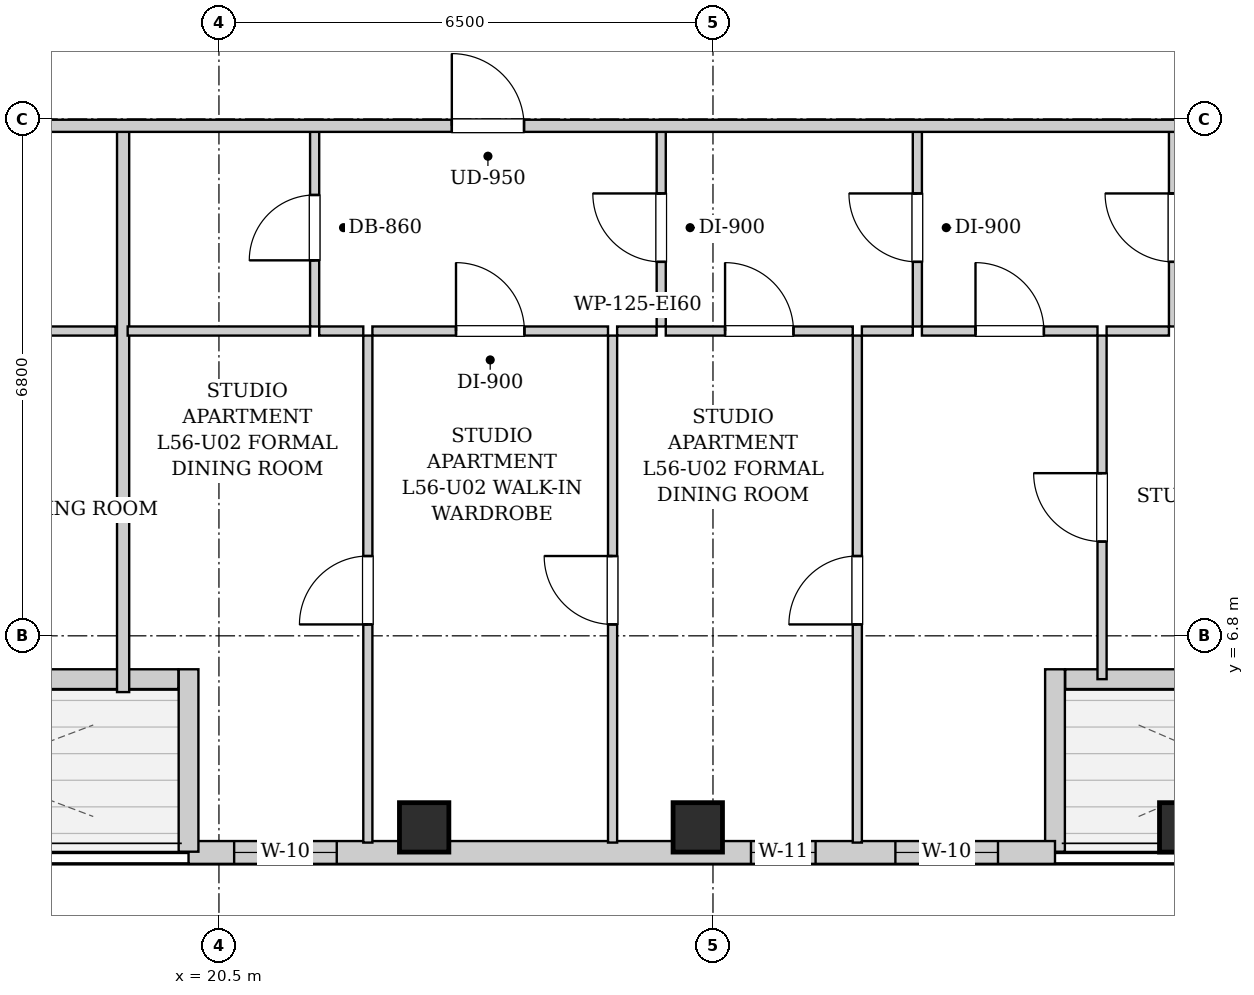
"""IFC4 building model, lengths in metres.
Left out: names, types, materials, properties, quantities, classifications, styles, units other than length and angle.
Written with IfcOpenShell. Run it as: python <this file> out.ifc"""

import sys

from ifc_helpers import new_model, si_unit, direction, frame, frame_2d, origin, origin_2d, place, context, subcontext, project, spatial, rectangle, extrude, element, fill, save


model = new_model("IFC4")
c1 = context("Model", 3, precision=1e-05, world=origin(), true_north=direction((0.0, 1.0)))
c2 = subcontext(c1, "Body", "Model", "MODEL_VIEW")
j1 = project(units=[si_unit("LENGTHUNIT", "METRE"), si_unit("PLANEANGLEUNIT", "RADIAN")], contexts=[c1])
p1 = place(None, origin())
s1 = spatial("IfcSite", under=j1, at=p1, CompositionType="ELEMENT")
p2 = place(p1, origin())
s2 = spatial("IfcBuilding", under=s1, at=p2, CompositionType="ELEMENT")
p3 = place(p2, frame((0.0, 0.0, 194.2)))
s3 = spatial("IfcBuildingStorey", under=s2, at=p3, CompositionType="ELEMENT", Elevation=194.2)
for number, where, z_axis, x_axis in (
    (1, (23.2, 4.28, 0.0), (0.0, 0.0, 1.0), (1.0, 0.0, 0.0)),
    (2, (26.8, 4.28, 0.0), (0.0, 0.0, 1.0), (1.0, 0.0, 0.0)),
    (3, (33.2, 4.28, 0.0), (0.0, 0.0, 1.0), (1.0, 0.0, 0.0)),
):
    element("IfcColumn", number, at=place(p3, frame(where, z_axis=z_axis, x_axis=x_axis)), inside=s3, PredefinedType="COLUMN", context=c2, shape_type="SweptSolid", body=[
        extrude(rectangle(XDim=0.65, YDim=0.65, at=origin_2d()), origin(), (0.0, 0.0, 1.0), 3.3),
    ])
p4 = place(p3, frame((36.366, 6.23, 0.0), z_axis=(0.0, 0.0, 1.0), x_axis=(-1.0, 0.0, 0.0)))
e4 = element("IfcWall", 4, at=p4, inside=s3, PredefinedType="SOLIDWALL", context=c2, shape_type="SweptSolid", body=[
    extrude(rectangle(XDim=4.732, YDim=0.26, at=frame_2d((2.366, 0.0))), origin(), (0.0, 0.0, 1.0), 3.04),
])
p5 = place(p4, frame((1.816, 0.0, 0.0)))
e5 = element("IfcOpeningElement", 5, at=p5, cuts=e4, PredefinedType="OPENING", context=c2, shape_type="SweptSolid", body=[
    extrude(rectangle(XDim=1.1, YDim=2.0, at=frame_2d((0.55, 1.0))), frame((0.0, 0.14, 0.0), z_axis=(0.0, -1.0, 0.0), x_axis=(1.0, 0.0, 0.0)), (0.0, 0.0, 1.0), 0.28),
])
p6 = place(p3, frame((31.5, 6.36, 0.0), z_axis=(0.0, 0.0, 1.0), x_axis=(0.0, -1.0, 0.0)))
e6 = element("IfcWall", 6, at=p6, inside=s3, PredefinedType="SOLIDWALL", context=c2, shape_type="SweptSolid", body=[
    extrude(rectangle(XDim=2.4, YDim=0.26, at=frame_2d((1.2, 0.0))), origin(), (0.0, 0.0, 1.0), 3.04),
])
p7 = place(p3, frame((31.5, 3.95, 0.0), z_axis=(0.0, 0.0, 1.0), x_axis=(-1.0, 0.0, 0.0)))
e7 = element("IfcWall", 7, at=p7, inside=s3, PredefinedType="SOLIDWALL", context=c2, shape_type="SweptSolid", body=[
    extrude(rectangle(XDim=11.4, YDim=0.3, at=frame_2d((5.7, 0.0))), origin(), (0.0, 0.0, 1.0), 3.04),
])
p8 = place(p7, frame((9.45, 0.0, 0.55)))
e8 = element("IfcOpeningElement", 8, at=p8, cuts=e7, PredefinedType="OPENING", context=c2, shape_type="SweptSolid", body=[
    extrude(rectangle(XDim=1.35, YDim=1.2, at=frame_2d((0.675, 0.6))), frame((0.0, 0.16, 0.0), z_axis=(0.0, -1.0, 0.0), x_axis=(1.0, 0.0, 0.0)), (0.0, 0.0, 1.0), 0.32),
])
p9 = place(p7, frame((3.15, 0.0, 0.55)))
e9 = element("IfcOpeningElement", 9, at=p9, cuts=e7, PredefinedType="OPENING", context=c2, shape_type="SweptSolid", body=[
    extrude(rectangle(XDim=0.85, YDim=1.2, at=frame_2d((0.425, 0.6))), frame((0.0, 0.16, 0.0), z_axis=(0.0, -1.0, 0.0), x_axis=(1.0, 0.0, 0.0)), (0.0, 0.0, 1.0), 0.32),
])
p10 = place(p7, frame((0.75, 0.0, 0.55)))
e10 = element("IfcOpeningElement", 10, at=p10, cuts=e7, PredefinedType="OPENING", context=c2, shape_type="SweptSolid", body=[
    extrude(rectangle(XDim=1.35, YDim=1.2, at=frame_2d((0.675, 0.6))), frame((0.0, 0.16, 0.0), z_axis=(0.0, -1.0, 0.0), x_axis=(1.0, 0.0, 0.0)), (0.0, 0.0, 1.0), 0.32),
])
p11 = place(p3, frame((20.1, 3.96, 0.0), z_axis=(0.0, 0.0, 1.0), x_axis=(0.0, 1.0, 0.0)))
e11 = element("IfcWall", 11, at=p11, inside=s3, PredefinedType="SOLIDWALL", context=c2, shape_type="SweptSolid", body=[
    extrude(rectangle(XDim=2.4, YDim=0.26, at=frame_2d((1.2, 0.0))), origin(), (0.0, 0.0, 1.0), 3.04),
])
p12 = place(p3, frame((19.966, 6.23, 0.0), z_axis=(0.0, 0.0, 1.0), x_axis=(-1.0, 0.0, 0.0)))
e12 = element("IfcWall", 12, at=p12, inside=s3, PredefinedType="SOLIDWALL", context=c2, shape_type="SweptSolid", body=[
    extrude(rectangle(XDim=5.432, YDim=0.26, at=frame_2d((2.716, 0.0))), origin(), (0.0, 0.0, 1.0), 3.04),
])
p13 = place(p12, frame((2.166, 0.0, 0.0)))
e13 = element("IfcOpeningElement", 13, at=p13, cuts=e12, PredefinedType="OPENING", context=c2, shape_type="SweptSolid", body=[
    extrude(rectangle(XDim=1.1, YDim=2.0, at=frame_2d((0.55, 1.0))), frame((0.0, 0.14, 0.0), z_axis=(0.0, -1.0, 0.0), x_axis=(1.0, 0.0, 0.0)), (0.0, 0.0, 1.0), 0.28),
])
p14 = place(p3, frame((15.15, 10.81, 0.0), z_axis=(0.0, 0.0, 1.0), x_axis=(1.0, 0.0, 0.0)))
e14 = element("IfcWall", 14, at=p14, inside=s3, PredefinedType="PARTITIONING", context=c2, shape_type="SweptSolid", body=[
    extrude(rectangle(XDim=3.989, YDim=0.12, at=frame_2d((1.995, 0.0))), origin(), (0.0, 0.0, 1.0), 3.04),
])
p15 = place(p14, frame((1.544, 0.0, 0.0)))
e15 = element("IfcOpeningElement", 15, at=p15, cuts=e14, PredefinedType="OPENING", context=c2, shape_type="SweptSolid", body=[
    extrude(rectangle(XDim=0.9, YDim=2.05, at=frame_2d((0.45, 1.025))), frame((0.0, 0.07, 0.0), z_axis=(0.0, -1.0, 0.0), x_axis=(1.0, 0.0, 0.0)), (0.0, 0.0, 1.0), 0.14),
])
p16 = place(p3, frame((19.239, 6.06, 0.0), z_axis=(0.0, 0.0, 1.0), x_axis=(0.0, 1.0, 0.0)))
e16 = element("IfcWall", 16, at=p16, inside=s3, PredefinedType="PARTITIONING", context=c2, shape_type="SweptSolid", body=[
    extrude(rectangle(XDim=7.41, YDim=0.16, at=frame_2d((3.705, 0.0))), origin(), (0.0, 0.0, 1.0), 3.04),
])
p17 = place(p3, frame((21.759, 10.87, 0.0), z_axis=(0.0, 0.0, 1.0), x_axis=(0.0, 1.0, 0.0)))
e17 = element("IfcWall", 17, at=p17, inside=s3, PredefinedType="PARTITIONING", context=c2, shape_type="SweptSolid", body=[
    extrude(rectangle(XDim=2.6, YDim=0.12, at=frame_2d((1.3, 0.0))), origin(), (0.0, 0.0, 1.0), 3.04),
])
p18 = place(p17, frame((0.87, 0.0, 0.0)))
e18 = element("IfcOpeningElement", 18, at=p18, cuts=e17, PredefinedType="OPENING", context=c2, shape_type="SweptSolid", body=[
    extrude(rectangle(XDim=0.86, YDim=2.05, at=frame_2d((0.43, 1.025))), frame((0.0, 0.07, 0.0), z_axis=(0.0, -1.0, 0.0), x_axis=(1.0, 0.0, 0.0)), (0.0, 0.0, 1.0), 0.14),
])
p19 = place(p3, frame((19.299, 10.81, 0.0), z_axis=(0.0, 0.0, 1.0), x_axis=(1.0, 0.0, 0.0)))
e19 = element("IfcWall", 19, at=p19, inside=s3, PredefinedType="PARTITIONING", context=c2, shape_type="SweptSolid", body=[
    extrude(rectangle(XDim=2.4, YDim=0.12, at=frame_2d((1.2, 0.0))), origin(), (0.0, 0.0, 1.0), 3.04),
])
p20 = place(p3, frame((26.319, 10.87, 0.0), z_axis=(0.0, 0.0, 1.0), x_axis=(0.0, 1.0, 0.0)))
e20 = element("IfcWall", 20, at=p20, inside=s3, PredefinedType="PARTITIONING", context=c2, shape_type="SweptSolid", body=[
    extrude(rectangle(XDim=2.6, YDim=0.12, at=frame_2d((1.3, 0.0))), origin(), (0.0, 0.0, 1.0), 3.04),
])
p21 = place(p20, frame((0.85, 0.0, 0.0)))
e21 = element("IfcOpeningElement", 21, at=p21, cuts=e20, PredefinedType="OPENING", context=c2, shape_type="SweptSolid", body=[
    extrude(rectangle(XDim=0.9, YDim=2.05, at=frame_2d((0.45, 1.025))), frame((0.0, 0.07, 0.0), z_axis=(0.0, -1.0, 0.0), x_axis=(1.0, 0.0, 0.0)), (0.0, 0.0, 1.0), 0.14),
])
p22 = place(p3, frame((21.819, 10.81, 0.0), z_axis=(0.0, 0.0, 1.0), x_axis=(1.0, 0.0, 0.0)))
e22 = element("IfcWall", 22, at=p22, inside=s3, PredefinedType="PARTITIONING", context=c2, shape_type="SweptSolid", body=[
    extrude(rectangle(XDim=0.58, YDim=0.12, at=frame_2d((0.29, 0.0))), origin(), (0.0, 0.0, 1.0), 3.04),
])
p23 = place(p3, frame((22.519, 10.81, 0.0), z_axis=(0.0, 0.0, 1.0), x_axis=(1.0, 0.0, 0.0)))
e23 = element("IfcWall", 23, at=p23, inside=s3, PredefinedType="PARTITIONING", context=c2, shape_type="SweptSolid", body=[
    extrude(rectangle(XDim=3.1, YDim=0.12, at=frame_2d((1.55, 0.0))), origin(), (0.0, 0.0, 1.0), 3.04),
])
p24 = place(p23, frame((1.1, 0.0, 0.0)))
e24 = element("IfcOpeningElement", 24, at=p24, cuts=e23, PredefinedType="OPENING", context=c2, shape_type="SweptSolid", body=[
    extrude(rectangle(XDim=0.9, YDim=2.05, at=frame_2d((0.45, 1.025))), frame((0.0, 0.07, 0.0), z_axis=(0.0, -1.0, 0.0), x_axis=(1.0, 0.0, 0.0)), (0.0, 0.0, 1.0), 0.14),
])
p25 = place(p3, frame((25.739, 10.81, 0.0), z_axis=(0.0, 0.0, 1.0), x_axis=(1.0, 0.0, 0.0)))
e25 = element("IfcWall", 25, at=p25, inside=s3, PredefinedType="PARTITIONING", context=c2, shape_type="SweptSolid", body=[
    extrude(rectangle(XDim=0.52, YDim=0.12, at=frame_2d((0.26, 0.0))), origin(), (0.0, 0.0, 1.0), 3.04),
])
p26 = place(p3, frame((29.689, 10.87, 0.0), z_axis=(0.0, 0.0, 1.0), x_axis=(0.0, 1.0, 0.0)))
e26 = element("IfcWall", 26, at=p26, inside=s3, PredefinedType="PARTITIONING", context=c2, shape_type="SweptSolid", body=[
    extrude(rectangle(XDim=2.6, YDim=0.12, at=frame_2d((1.3, 0.0))), origin(), (0.0, 0.0, 1.0), 3.04),
])
p27 = place(p26, frame((0.85, 0.0, 0.0)))
e27 = element("IfcOpeningElement", 27, at=p27, cuts=e26, PredefinedType="OPENING", context=c2, shape_type="SweptSolid", body=[
    extrude(rectangle(XDim=0.9, YDim=2.05, at=frame_2d((0.45, 1.025))), frame((0.0, 0.07, 0.0), z_axis=(0.0, -1.0, 0.0), x_axis=(1.0, 0.0, 0.0)), (0.0, 0.0, 1.0), 0.14),
])
p28 = place(p3, frame((26.379, 10.81, 0.0), z_axis=(0.0, 0.0, 1.0), x_axis=(1.0, 0.0, 0.0)))
e28 = element("IfcWall", 28, at=p28, inside=s3, PredefinedType="PARTITIONING", context=c2, shape_type="SweptSolid", body=[
    extrude(rectangle(XDim=2.46, YDim=0.12, at=frame_2d((1.23, 0.0))), origin(), (0.0, 0.0, 1.0), 3.04),
])
p29 = place(p28, frame((0.78, 0.0, 0.0)))
e29 = element("IfcOpeningElement", 29, at=p29, cuts=e28, PredefinedType="OPENING", context=c2, shape_type="SweptSolid", body=[
    extrude(rectangle(XDim=0.9, YDim=2.05, at=frame_2d((0.45, 1.025))), frame((0.0, 0.07, 0.0), z_axis=(0.0, -1.0, 0.0), x_axis=(1.0, 0.0, 0.0)), (0.0, 0.0, 1.0), 0.14),
])
p30 = place(p3, frame((28.959, 10.81, 0.0), z_axis=(0.0, 0.0, 1.0), x_axis=(1.0, 0.0, 0.0)))
e30 = element("IfcWall", 30, at=p30, inside=s3, PredefinedType="PARTITIONING", context=c2, shape_type="SweptSolid", body=[
    extrude(rectangle(XDim=0.67, YDim=0.12, at=frame_2d((0.335, 0.0))), origin(), (0.0, 0.0, 1.0), 3.04),
])
p31 = place(p3, frame((33.059, 10.87, 0.0), z_axis=(0.0, 0.0, 1.0), x_axis=(0.0, 1.0, 0.0)))
e31 = element("IfcWall", 31, at=p31, inside=s3, PredefinedType="PARTITIONING", context=c2, shape_type="SweptSolid", body=[
    extrude(rectangle(XDim=2.6, YDim=0.12, at=frame_2d((1.3, 0.0))), origin(), (0.0, 0.0, 1.0), 3.04),
])
p32 = place(p31, frame((0.85, 0.0, 0.0)))
e32 = element("IfcOpeningElement", 32, at=p32, cuts=e31, PredefinedType="OPENING", context=c2, shape_type="SweptSolid", body=[
    extrude(rectangle(XDim=0.9, YDim=2.05, at=frame_2d((0.45, 1.025))), frame((0.0, 0.07, 0.0), z_axis=(0.0, -1.0, 0.0), x_axis=(1.0, 0.0, 0.0)), (0.0, 0.0, 1.0), 0.14),
])
p33 = place(p3, frame((29.749, 10.81, 0.0), z_axis=(0.0, 0.0, 1.0), x_axis=(1.0, 0.0, 0.0)))
e33 = element("IfcWall", 33, at=p33, inside=s3, PredefinedType="PARTITIONING", context=c2, shape_type="SweptSolid", body=[
    extrude(rectangle(XDim=2.31, YDim=0.12, at=frame_2d((1.155, 0.0))), origin(), (0.0, 0.0, 1.0), 3.04),
])
p34 = place(p33, frame((0.705, 0.0, 0.0)))
e34 = element("IfcOpeningElement", 34, at=p34, cuts=e33, PredefinedType="OPENING", context=c2, shape_type="SweptSolid", body=[
    extrude(rectangle(XDim=0.9, YDim=2.05, at=frame_2d((0.45, 1.025))), frame((0.0, 0.07, 0.0), z_axis=(0.0, -1.0, 0.0), x_axis=(1.0, 0.0, 0.0)), (0.0, 0.0, 1.0), 0.14),
])
p35 = place(p3, frame((32.179, 10.81, 0.0), z_axis=(0.0, 0.0, 1.0), x_axis=(1.0, 0.0, 0.0)))
e35 = element("IfcWall", 35, at=p35, inside=s3, PredefinedType="PARTITIONING", context=c2, shape_type="SweptSolid", body=[
    extrude(rectangle(XDim=0.82, YDim=0.12, at=frame_2d((0.41, 0.0))), origin(), (0.0, 0.0, 1.0), 3.04),
])
p36 = place(p3, frame((22.459, 4.08, 0.0), z_axis=(0.0, 0.0, 1.0), x_axis=(0.0, 1.0, 0.0)))
e36 = element("IfcWall", 36, at=p36, inside=s3, PredefinedType="PARTITIONING", context=c2, shape_type="SweptSolid", body=[
    extrude(rectangle(XDim=6.67, YDim=0.12, at=frame_2d((3.335, 0.0))), origin(), (0.0, 0.0, 1.0), 3.04),
])
p37 = place(p36, frame((2.87, 0.0, 0.0)))
e37 = element("IfcOpeningElement", 37, at=p37, cuts=e36, PredefinedType="OPENING", context=c2, shape_type="SweptSolid", body=[
    extrude(rectangle(XDim=0.9, YDim=2.05, at=frame_2d((0.45, 1.025))), frame((0.0, 0.07, 0.0), z_axis=(0.0, -1.0, 0.0), x_axis=(1.0, 0.0, 0.0)), (0.0, 0.0, 1.0), 0.14),
])
p38 = place(p3, frame((25.679, 4.08, 0.0), z_axis=(0.0, 0.0, 1.0), x_axis=(0.0, 1.0, 0.0)))
e38 = element("IfcWall", 38, at=p38, inside=s3, PredefinedType="PARTITIONING", context=c2, shape_type="SweptSolid", body=[
    extrude(rectangle(XDim=6.67, YDim=0.12, at=frame_2d((3.335, 0.0))), origin(), (0.0, 0.0, 1.0), 3.04),
])
p39 = place(p38, frame((2.87, 0.0, 0.0)))
e39 = element("IfcOpeningElement", 39, at=p39, cuts=e38, PredefinedType="OPENING", context=c2, shape_type="SweptSolid", body=[
    extrude(rectangle(XDim=0.9, YDim=2.05, at=frame_2d((0.45, 1.025))), frame((0.0, 0.07, 0.0), z_axis=(0.0, -1.0, 0.0), x_axis=(1.0, 0.0, 0.0)), (0.0, 0.0, 1.0), 0.14),
])
p40 = place(p3, frame((28.899, 4.08, 0.0), z_axis=(0.0, 0.0, 1.0), x_axis=(0.0, 1.0, 0.0)))
e40 = element("IfcWall", 40, at=p40, inside=s3, PredefinedType="PARTITIONING", context=c2, shape_type="SweptSolid", body=[
    extrude(rectangle(XDim=6.67, YDim=0.12, at=frame_2d((3.335, 0.0))), origin(), (0.0, 0.0, 1.0), 3.04),
])
p41 = place(p40, frame((2.87, 0.0, 0.0)))
e41 = element("IfcOpeningElement", 41, at=p41, cuts=e40, PredefinedType="OPENING", context=c2, shape_type="SweptSolid", body=[
    extrude(rectangle(XDim=0.9, YDim=2.05, at=frame_2d((0.45, 1.025))), frame((0.0, 0.07, 0.0), z_axis=(0.0, -1.0, 0.0), x_axis=(1.0, 0.0, 0.0)), (0.0, 0.0, 1.0), 0.14),
])
p42 = place(p3, frame((32.119, 6.23, 0.0), z_axis=(0.0, 0.0, 1.0), x_axis=(0.0, 1.0, 0.0)))
e42 = element("IfcWall", 42, at=p42, inside=s3, PredefinedType="PARTITIONING", context=c2, shape_type="SweptSolid", body=[
    extrude(rectangle(XDim=4.52, YDim=0.12, at=frame_2d((2.26, 0.0))), origin(), (0.0, 0.0, 1.0), 3.04),
])
p43 = place(p42, frame((1.81, 0.0, 0.0)))
e43 = element("IfcOpeningElement", 43, at=p43, cuts=e42, PredefinedType="OPENING", context=c2, shape_type="SweptSolid", body=[
    extrude(rectangle(XDim=0.9, YDim=2.05, at=frame_2d((0.45, 1.025))), frame((0.0, 0.07, 0.0), z_axis=(0.0, -1.0, 0.0), x_axis=(1.0, 0.0, 0.0)), (0.0, 0.0, 1.0), 0.14),
])
p44 = place(p3, frame((13.15, 13.51, 0.0), z_axis=(0.0, 0.0, 1.0), x_axis=(1.0, 0.0, 0.0)))
e44 = element("IfcWall", 44, at=p44, inside=s3, PredefinedType="PARTITIONING", context=c2, shape_type="SweptSolid", body=[
    extrude(rectangle(XDim=24.6, YDim=0.16, at=frame_2d((12.3, 0.0))), origin(), (0.0, 0.0, 1.0), 3.04),
])
p45 = place(p44, frame((3.115, 0.0, 0.0)))
e45 = element("IfcOpeningElement", 45, at=p45, cuts=e44, PredefinedType="OPENING", context=c2, shape_type="SweptSolid", body=[
    extrude(rectangle(XDim=0.95, YDim=2.1, at=frame_2d((0.475, 1.05))), frame((0.0, 0.09, 0.0), z_axis=(0.0, -1.0, 0.0), x_axis=(1.0, 0.0, 0.0)), (0.0, 0.0, 1.0), 0.18),
])
p46 = place(p44, frame((10.414, 0.0, 0.0)))
e46 = element("IfcOpeningElement", 46, at=p46, cuts=e44, PredefinedType="OPENING", context=c2, shape_type="SweptSolid", body=[
    extrude(rectangle(XDim=0.95, YDim=2.1, at=frame_2d((0.475, 1.05))), frame((0.0, 0.09, 0.0), z_axis=(0.0, -1.0, 0.0), x_axis=(1.0, 0.0, 0.0)), (0.0, 0.0, 1.0), 0.18),
])
p47 = place(p18, origin())
e47 = element("IfcDoor", 47, at=p47, inside=s3, OperationType="SINGLE_SWING_LEFT", PredefinedType="DOOR", context=c2, shape_type="SweptSolid", body=[
    extrude(rectangle(XDim=0.86, YDim=2.05, at=frame_2d((0.43, 1.025))), frame((0.0, 0.025, 0.0), z_axis=(0.0, -1.0, 0.0), x_axis=(1.0, 0.0, 0.0)), (0.0, 0.0, 1.0), 0.05),
])
fill(e18, e47)
p48 = place(p21, origin())
e48 = element("IfcDoor", 48, at=p48, inside=s3, OperationType="SINGLE_SWING_RIGHT", PredefinedType="DOOR", context=c2, shape_type="SweptSolid", body=[
    extrude(rectangle(XDim=0.9, YDim=2.05, at=frame_2d((0.45, 1.025))), frame((0.0, 0.025, 0.0), z_axis=(0.0, -1.0, 0.0), x_axis=(1.0, 0.0, 0.0)), (0.0, 0.0, 1.0), 0.05),
])
fill(e21, e48)
p49 = place(p24, origin())
e49 = element("IfcDoor", 49, at=p49, inside=s3, OperationType="SINGLE_SWING_LEFT", PredefinedType="DOOR", context=c2, shape_type="SweptSolid", body=[
    extrude(rectangle(XDim=0.9, YDim=2.05, at=frame_2d((0.45, 1.025))), frame((0.0, 0.025, 0.0), z_axis=(0.0, -1.0, 0.0), x_axis=(1.0, 0.0, 0.0)), (0.0, 0.0, 1.0), 0.05),
])
fill(e24, e49)
p50 = place(p27, origin())
e50 = element("IfcDoor", 50, at=p50, inside=s3, OperationType="SINGLE_SWING_RIGHT", PredefinedType="DOOR", context=c2, shape_type="SweptSolid", body=[
    extrude(rectangle(XDim=0.9, YDim=2.05, at=frame_2d((0.45, 1.025))), frame((0.0, 0.025, 0.0), z_axis=(0.0, -1.0, 0.0), x_axis=(1.0, 0.0, 0.0)), (0.0, 0.0, 1.0), 0.05),
])
fill(e27, e50)
p51 = place(p29, origin())
e51 = element("IfcDoor", 51, at=p51, inside=s3, OperationType="SINGLE_SWING_LEFT", PredefinedType="DOOR", context=c2, shape_type="SweptSolid", body=[
    extrude(rectangle(XDim=0.9, YDim=2.05, at=frame_2d((0.45, 1.025))), frame((0.0, 0.025, 0.0), z_axis=(0.0, -1.0, 0.0), x_axis=(1.0, 0.0, 0.0)), (0.0, 0.0, 1.0), 0.05),
])
fill(e29, e51)
p52 = place(p32, origin())
e52 = element("IfcDoor", 52, at=p52, inside=s3, OperationType="SINGLE_SWING_RIGHT", PredefinedType="DOOR", context=c2, shape_type="SweptSolid", body=[
    extrude(rectangle(XDim=0.9, YDim=2.05, at=frame_2d((0.45, 1.025))), frame((0.0, 0.025, 0.0), z_axis=(0.0, -1.0, 0.0), x_axis=(1.0, 0.0, 0.0)), (0.0, 0.0, 1.0), 0.05),
])
fill(e32, e52)
p53 = place(p34, origin())
e53 = element("IfcDoor", 53, at=p53, inside=s3, OperationType="SINGLE_SWING_LEFT", PredefinedType="DOOR", context=c2, shape_type="SweptSolid", body=[
    extrude(rectangle(XDim=0.9, YDim=2.05, at=frame_2d((0.45, 1.025))), frame((0.0, 0.025, 0.0), z_axis=(0.0, -1.0, 0.0), x_axis=(1.0, 0.0, 0.0)), (0.0, 0.0, 1.0), 0.05),
])
fill(e34, e53)
p54 = place(p37, origin())
e54 = element("IfcDoor", 54, at=p54, inside=s3, OperationType="SINGLE_SWING_LEFT", PredefinedType="DOOR", context=c2, shape_type="SweptSolid", body=[
    extrude(rectangle(XDim=0.9, YDim=2.05, at=frame_2d((0.45, 1.025))), frame((0.0, 0.025, 0.0), z_axis=(0.0, -1.0, 0.0), x_axis=(1.0, 0.0, 0.0)), (0.0, 0.0, 1.0), 0.05),
])
fill(e37, e54)
p55 = place(p39, origin())
e55 = element("IfcDoor", 55, at=p55, inside=s3, OperationType="SINGLE_SWING_RIGHT", PredefinedType="DOOR", context=c2, shape_type="SweptSolid", body=[
    extrude(rectangle(XDim=0.9, YDim=2.05, at=frame_2d((0.45, 1.025))), frame((0.0, 0.025, 0.0), z_axis=(0.0, -1.0, 0.0), x_axis=(1.0, 0.0, 0.0)), (0.0, 0.0, 1.0), 0.05),
])
fill(e39, e55)
p56 = place(p41, origin())
e56 = element("IfcDoor", 56, at=p56, inside=s3, OperationType="SINGLE_SWING_LEFT", PredefinedType="DOOR", context=c2, shape_type="SweptSolid", body=[
    extrude(rectangle(XDim=0.9, YDim=2.05, at=frame_2d((0.45, 1.025))), frame((0.0, 0.025, 0.0), z_axis=(0.0, -1.0, 0.0), x_axis=(1.0, 0.0, 0.0)), (0.0, 0.0, 1.0), 0.05),
])
fill(e41, e56)
p57 = place(p43, origin())
e57 = element("IfcDoor", 57, at=p57, inside=s3, OperationType="SINGLE_SWING_RIGHT", PredefinedType="DOOR", context=c2, shape_type="SweptSolid", body=[
    extrude(rectangle(XDim=0.9, YDim=2.05, at=frame_2d((0.45, 1.025))), frame((0.0, 0.025, 0.0), z_axis=(0.0, -1.0, 0.0), x_axis=(1.0, 0.0, 0.0)), (0.0, 0.0, 1.0), 0.05),
])
fill(e43, e57)
p58 = place(p46, origin())
e58 = element("IfcDoor", 58, at=p58, inside=s3, OperationType="SINGLE_SWING_LEFT", PredefinedType="DOOR", context=c2, shape_type="SweptSolid", body=[
    extrude(rectangle(XDim=0.95, YDim=2.1, at=frame_2d((0.475, 1.05))), frame((0.0, 0.025, 0.0), z_axis=(0.0, -1.0, 0.0), x_axis=(1.0, 0.0, 0.0)), (0.0, 0.0, 1.0), 0.05),
])
fill(e46, e58)
p59 = place(p8, origin())
e59 = element("IfcWindow", 59, at=p59, inside=s3, PartitioningType="SINGLE_PANEL", PredefinedType="WINDOW", context=c2, shape_type="SweptSolid", body=[
    extrude(rectangle(XDim=1.35, YDim=1.2, at=frame_2d((0.675, 0.6))), frame((0.0, 0.03, 0.0), z_axis=(0.0, -1.0, 0.0), x_axis=(1.0, 0.0, 0.0)), (0.0, 0.0, 1.0), 0.06),
])
fill(e8, e59)
p60 = place(p9, origin())
e60 = element("IfcWindow", 60, at=p60, inside=s3, PartitioningType="SINGLE_PANEL", PredefinedType="WINDOW", context=c2, shape_type="SweptSolid", body=[
    extrude(rectangle(XDim=0.85, YDim=1.2, at=frame_2d((0.425, 0.6))), frame((0.0, 0.03, 0.0), z_axis=(0.0, -1.0, 0.0), x_axis=(1.0, 0.0, 0.0)), (0.0, 0.0, 1.0), 0.06),
])
fill(e9, e60)
p61 = place(p10, origin())
e61 = element("IfcWindow", 61, at=p61, inside=s3, PartitioningType="SINGLE_PANEL", PredefinedType="WINDOW", context=c2, shape_type="SweptSolid", body=[
    extrude(rectangle(XDim=1.35, YDim=1.2, at=frame_2d((0.675, 0.6))), frame((0.0, 0.03, 0.0), z_axis=(0.0, -1.0, 0.0), x_axis=(1.0, 0.0, 0.0)), (0.0, 0.0, 1.0), 0.06),
])
fill(e10, e61)
save(model, sys.argv[1])
